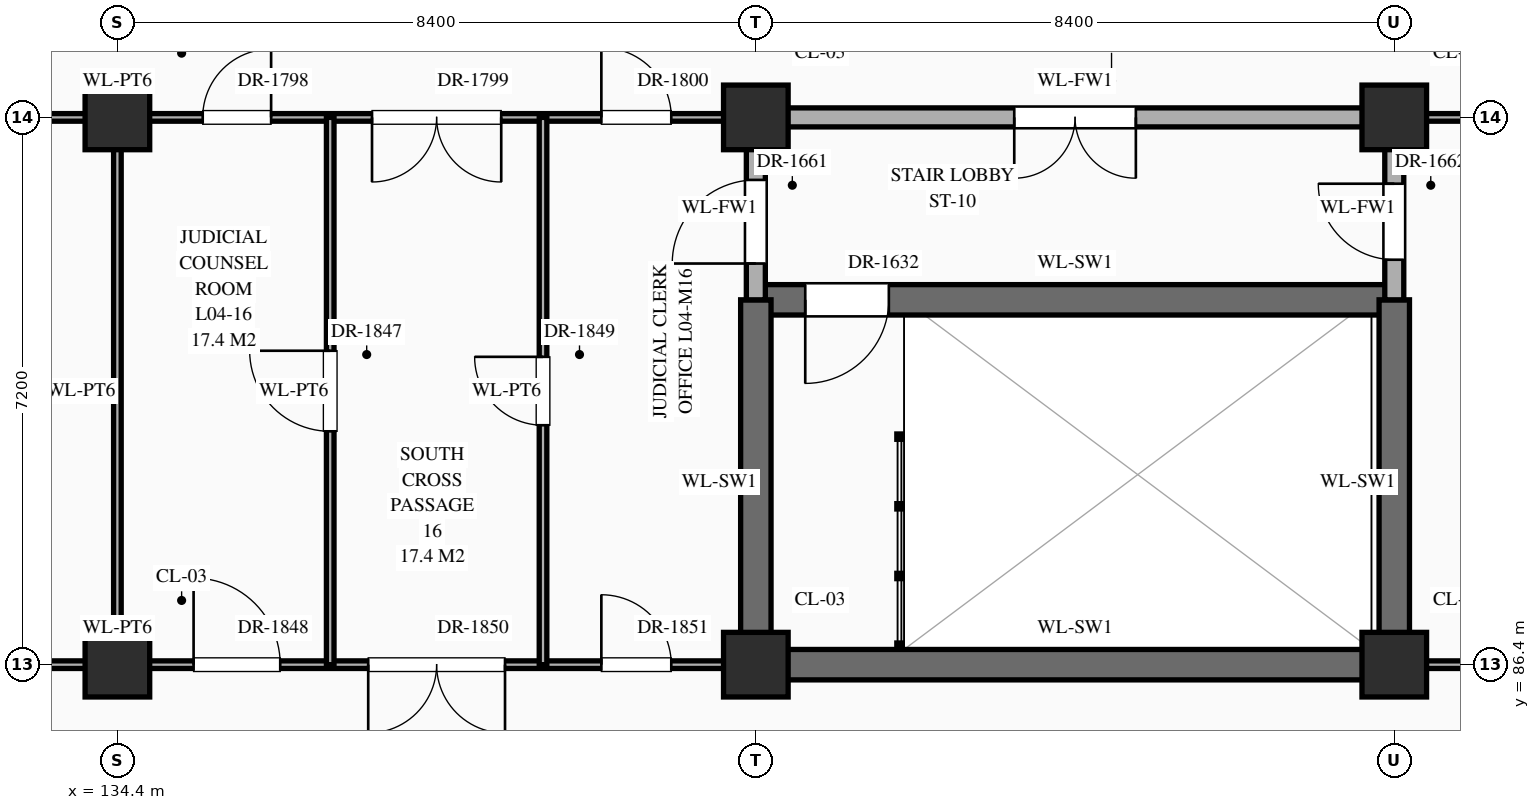
"""IFC4 building model, lengths in metres.
Left out: names, types, materials, properties, quantities, classifications, styles, units other than length and angle.
Written with IfcOpenShell. Run it as: python <this file> out.ifc"""

import sys

from ifc_helpers import new_model, si_unit, direction, frame, frame_2d, origin, origin_2d, place, context, subcontext, project, spatial, rectangle, extrude, element, fill, save


model = new_model("IFC4")
c1 = context("Model", 3, precision=1e-05, world=origin(), true_north=direction((0.0, 1.0)))
c2 = subcontext(c1, "Body", "Model", "MODEL_VIEW")
j1 = project(units=[si_unit("LENGTHUNIT", "METRE"), si_unit("PLANEANGLEUNIT", "RADIAN")], contexts=[c1])
p1 = place(None, origin())
s1 = spatial("IfcSite", under=j1, at=p1, CompositionType="ELEMENT")
p2 = place(p1, origin())
s2 = spatial("IfcBuilding", under=s1, at=p2, CompositionType="ELEMENT")
p3 = place(p2, frame((0.0, 0.0, 16.2)))
s3 = spatial("IfcBuildingStorey", under=s2, at=p3, CompositionType="ELEMENT", Elevation=16.2)
for number, where, z_axis, x_axis in (
    (1, (134.4, 86.4, 0.0), (0.0, 0.0, 1.0), (1.0, 0.0, 0.0)),
    (2, (134.4, 93.6, 0.0), (0.0, 0.0, 1.0), (1.0, 0.0, 0.0)),
    (3, (142.8, 86.4, 0.0), (0.0, 0.0, 1.0), (1.0, 0.0, 0.0)),
    (4, (142.8, 93.6, 0.0), (0.0, 0.0, 1.0), (1.0, 0.0, 0.0)),
    (5, (151.2, 86.4, 0.0), (0.0, 0.0, 1.0), (1.0, 0.0, 0.0)),
    (6, (151.2, 93.6, 0.0), (0.0, 0.0, 1.0), (1.0, 0.0, 0.0)),
):
    element("IfcColumn", number, at=place(p3, frame(where, z_axis=z_axis, x_axis=x_axis)), inside=s3, PredefinedType="COLUMN", context=c2, shape_type="SweptSolid", body=[
        extrude(rectangle(XDim=0.85, YDim=0.85, at=origin_2d()), origin(), (0.0, 0.0, 1.0), 5.4),
    ])
p4 = place(p3, frame((126.0, 86.4, 0.0), z_axis=(0.0, 0.0, 1.0), x_axis=(1.0, 0.0, 0.0)))
e7 = element("IfcWall", 7, at=p4, inside=s3, PredefinedType="STANDARD", context=c2, shape_type="SweptSolid", body=[
    extrude(rectangle(XDim=16.8, YDim=0.1, at=frame_2d((8.4, 0.0))), origin(), (0.0, 0.0, 1.0), 4.27),
])
p5 = place(p4, frame((3.69, 0.0, 0.0)))
e8 = element("IfcOpeningElement", 8, at=p5, cuts=e7, PredefinedType="OPENING", context=c2, shape_type="SweptSolid", body=[
    extrude(rectangle(XDim=1.02, YDim=2.4, at=frame_2d((0.51, 1.2))), frame((0.0, 0.062, 0.0), z_axis=(0.0, -1.0, 0.0), x_axis=(1.0, 0.0, 0.0)), (0.0, 0.0, 1.0), 0.124),
])
p6 = place(p4, frame((9.403, 0.0, 0.0)))
e9 = element("IfcOpeningElement", 9, at=p6, cuts=e7, PredefinedType="OPENING", context=c2, shape_type="SweptSolid", body=[
    extrude(rectangle(XDim=1.14, YDim=2.4, at=frame_2d((0.57, 1.2))), frame((0.0, 0.062, 0.0), z_axis=(0.0, -1.0, 0.0), x_axis=(1.0, 0.0, 0.0)), (0.0, 0.0, 1.0), 0.124),
])
p7 = place(p4, frame((11.7, 0.0, 0.0)))
e10 = element("IfcOpeningElement", 10, at=p7, cuts=e7, PredefinedType="OPENING", context=c2, shape_type="SweptSolid", body=[
    extrude(rectangle(XDim=1.8, YDim=2.5, at=frame_2d((0.9, 1.25))), frame((0.0, 0.062, 0.0), z_axis=(0.0, -1.0, 0.0), x_axis=(1.0, 0.0, 0.0)), (0.0, 0.0, 1.0), 0.124),
])
p8 = place(p4, frame((14.768, 0.0, 0.0)))
e11 = element("IfcOpeningElement", 11, at=p8, cuts=e7, PredefinedType="OPENING", context=c2, shape_type="SweptSolid", body=[
    extrude(rectangle(XDim=0.92, YDim=2.15, at=frame_2d((0.46, 1.075))), frame((0.0, 0.062, 0.0), z_axis=(0.0, -1.0, 0.0), x_axis=(1.0, 0.0, 0.0)), (0.0, 0.0, 1.0), 0.124),
])
p9 = place(p3, frame((142.8, 86.4, 0.0), z_axis=(0.0, 0.0, 1.0), x_axis=(1.0, 0.0, 0.0)))
e12 = element("IfcWall", 12, at=p9, inside=s3, PredefinedType="SHEAR", context=c2, shape_type="SweptSolid", body=[
    extrude(rectangle(XDim=8.4, YDim=0.4, at=frame_2d((4.2, 0.0))), origin(), (0.0, 0.0, 1.0), 5.05),
])
p10 = place(p3, frame((151.2, 86.4, 0.0), z_axis=(0.0, 0.0, 1.0), x_axis=(1.0, 0.0, 0.0)))
e13 = element("IfcWall", 13, at=p10, inside=s3, PredefinedType="STANDARD", context=c2, shape_type="SweptSolid", body=[
    extrude(rectangle(XDim=16.76, YDim=0.1, at=frame_2d((8.38, 0.0))), origin(), (0.0, 0.0, 1.0), 4.35),
])
p11 = place(p10, frame((3.72, 0.0, 0.0)))
e14 = element("IfcOpeningElement", 14, at=p11, cuts=e13, PredefinedType="OPENING", context=c2, shape_type="SweptSolid", body=[
    extrude(rectangle(XDim=0.96, YDim=2.2, at=frame_2d((0.48, 1.1))), frame((0.0, 0.062, 0.0), z_axis=(0.0, -1.0, 0.0), x_axis=(1.0, 0.0, 0.0)), (0.0, 0.0, 1.0), 0.124),
])
p12 = place(p10, frame((9.452, 0.0, 0.0)))
e15 = element("IfcOpeningElement", 15, at=p12, cuts=e13, PredefinedType="OPENING", context=c2, shape_type="SweptSolid", body=[
    extrude(rectangle(XDim=1.04, YDim=2.2, at=frame_2d((0.52, 1.1))), frame((0.0, 0.062, 0.0), z_axis=(0.0, -1.0, 0.0), x_axis=(1.0, 0.0, 0.0)), (0.0, 0.0, 1.0), 0.124),
])
p13 = place(p10, frame((12.04, 0.0, 0.0)))
e16 = element("IfcOpeningElement", 16, at=p13, cuts=e13, PredefinedType="OPENING", context=c2, shape_type="SweptSolid", body=[
    extrude(rectangle(XDim=1.12, YDim=2.25, at=frame_2d((0.56, 1.125))), frame((0.0, 0.062, 0.0), z_axis=(0.0, -1.0, 0.0), x_axis=(1.0, 0.0, 0.0)), (0.0, 0.0, 1.0), 0.124),
])
p14 = place(p10, frame((14.647, 0.0, 0.0)))
e17 = element("IfcOpeningElement", 17, at=p14, cuts=e13, PredefinedType="OPENING", context=c2, shape_type="SweptSolid", body=[
    extrude(rectangle(XDim=1.16, YDim=2.3, at=frame_2d((0.58, 1.15))), frame((0.0, 0.062, 0.0), z_axis=(0.0, -1.0, 0.0), x_axis=(1.0, 0.0, 0.0)), (0.0, 0.0, 1.0), 0.124),
])
p15 = place(p3, frame((142.8, 91.2, 0.0), z_axis=(0.0, 0.0, 1.0), x_axis=(1.0, 0.0, 0.0)))
e18 = element("IfcWall", 18, at=p15, inside=s3, PredefinedType="SHEAR", context=c2, shape_type="SweptSolid", body=[
    extrude(rectangle(XDim=8.4, YDim=0.4, at=frame_2d((4.2, 0.0))), origin(), (0.0, 0.0, 1.0), 5.05),
])
p16 = place(p15, frame((0.65, 0.0, 0.0)))
e19 = element("IfcOpeningElement", 19, at=p16, cuts=e18, PredefinedType="OPENING", context=c2, shape_type="SweptSolid", body=[
    extrude(rectangle(XDim=1.1, YDim=2.2, at=frame_2d((0.55, 1.1))), frame((0.0, 0.212, 0.0), z_axis=(0.0, -1.0, 0.0), x_axis=(1.0, 0.0, 0.0)), (0.0, 0.0, 1.0), 0.424),
])
p17 = place(p3, frame((126.0, 93.6, 0.0), z_axis=(0.0, 0.0, 1.0), x_axis=(1.0, 0.0, 0.0)))
e20 = element("IfcWall", 20, at=p17, inside=s3, PredefinedType="STANDARD", context=c2, shape_type="SweptSolid", body=[
    extrude(rectangle(XDim=16.8, YDim=0.1, at=frame_2d((8.4, 0.0))), origin(), (0.0, 0.0, 1.0), 4.27),
])
p18 = place(p17, frame((3.63, 0.0, 0.0)))
e21 = element("IfcOpeningElement", 21, at=p18, cuts=e20, PredefinedType="OPENING", context=c2, shape_type="SweptSolid", body=[
    extrude(rectangle(XDim=1.14, YDim=2.4, at=frame_2d((0.57, 1.2))), frame((0.0, 0.062, 0.0), z_axis=(0.0, -1.0, 0.0), x_axis=(1.0, 0.0, 0.0)), (0.0, 0.0, 1.0), 0.124),
])
p19 = place(p17, frame((9.522, 0.0, 0.0)))
e22 = element("IfcOpeningElement", 22, at=p19, cuts=e20, PredefinedType="OPENING", context=c2, shape_type="SweptSolid", body=[
    extrude(rectangle(XDim=0.9, YDim=2.15, at=frame_2d((0.45, 1.075))), frame((0.0, 0.062, 0.0), z_axis=(0.0, -1.0, 0.0), x_axis=(1.0, 0.0, 0.0)), (0.0, 0.0, 1.0), 0.124),
])
p20 = place(p17, frame((11.75, 0.0, 0.0)))
e23 = element("IfcOpeningElement", 23, at=p20, cuts=e20, PredefinedType="OPENING", context=c2, shape_type="SweptSolid", body=[
    extrude(rectangle(XDim=1.7, YDim=2.45, at=frame_2d((0.85, 1.225))), frame((0.0, 0.062, 0.0), z_axis=(0.0, -1.0, 0.0), x_axis=(1.0, 0.0, 0.0)), (0.0, 0.0, 1.0), 0.124),
])
p21 = place(p17, frame((14.768, 0.0, 0.0)))
e24 = element("IfcOpeningElement", 24, at=p21, cuts=e20, PredefinedType="OPENING", context=c2, shape_type="SweptSolid", body=[
    extrude(rectangle(XDim=0.92, YDim=2.15, at=frame_2d((0.46, 1.075))), frame((0.0, 0.062, 0.0), z_axis=(0.0, -1.0, 0.0), x_axis=(1.0, 0.0, 0.0)), (0.0, 0.0, 1.0), 0.124),
])
p22 = place(p3, frame((142.8, 93.6, 0.0), z_axis=(0.0, 0.0, 1.0), x_axis=(1.0, 0.0, 0.0)))
e25 = element("IfcWall", 25, at=p22, inside=s3, PredefinedType="STANDARD", context=c2, shape_type="SweptSolid", body=[
    extrude(rectangle(XDim=8.4, YDim=0.25, at=frame_2d((4.2, 0.0))), origin(), (0.0, 0.0, 1.0), 4.2),
])
p23 = place(p22, frame((3.4, 0.0, 0.0)))
e26 = element("IfcOpeningElement", 26, at=p23, cuts=e25, PredefinedType="OPENING", context=c2, shape_type="SweptSolid", body=[
    extrude(rectangle(XDim=1.6, YDim=2.3, at=frame_2d((0.8, 1.15))), frame((0.0, 0.137, 0.0), z_axis=(0.0, -1.0, 0.0), x_axis=(1.0, 0.0, 0.0)), (0.0, 0.0, 1.0), 0.274),
])
p24 = place(p3, frame((151.2, 93.6, 0.0), z_axis=(0.0, 0.0, 1.0), x_axis=(1.0, 0.0, 0.0)))
e27 = element("IfcWall", 27, at=p24, inside=s3, PredefinedType="STANDARD", context=c2, shape_type="SweptSolid", body=[
    extrude(rectangle(XDim=16.76, YDim=0.1, at=frame_2d((8.38, 0.0))), origin(), (0.0, 0.0, 1.0), 4.35),
])
p25 = place(p24, frame((3.72, 0.0, 0.0)))
e28 = element("IfcOpeningElement", 28, at=p25, cuts=e27, PredefinedType="OPENING", context=c2, shape_type="SweptSolid", body=[
    extrude(rectangle(XDim=0.96, YDim=2.2, at=frame_2d((0.48, 1.1))), frame((0.0, 0.062, 0.0), z_axis=(0.0, -1.0, 0.0), x_axis=(1.0, 0.0, 0.0)), (0.0, 0.0, 1.0), 0.124),
])
p26 = place(p24, frame((9.472, 0.0, 0.0)))
e29 = element("IfcOpeningElement", 29, at=p26, cuts=e27, PredefinedType="OPENING", context=c2, shape_type="SweptSolid", body=[
    extrude(rectangle(XDim=1.0, YDim=2.25, at=frame_2d((0.5, 1.125))), frame((0.0, 0.062, 0.0), z_axis=(0.0, -1.0, 0.0), x_axis=(1.0, 0.0, 0.0)), (0.0, 0.0, 1.0), 0.124),
])
p27 = place(p24, frame((12.08, 0.0, 0.0)))
e30 = element("IfcOpeningElement", 30, at=p27, cuts=e27, PredefinedType="OPENING", context=c2, shape_type="SweptSolid", body=[
    extrude(rectangle(XDim=1.04, YDim=2.2, at=frame_2d((0.52, 1.1))), frame((0.0, 0.062, 0.0), z_axis=(0.0, -1.0, 0.0), x_axis=(1.0, 0.0, 0.0)), (0.0, 0.0, 1.0), 0.124),
])
p28 = place(p24, frame((14.688, 0.0, 0.0)))
e31 = element("IfcOpeningElement", 31, at=p28, cuts=e27, PredefinedType="OPENING", context=c2, shape_type="SweptSolid", body=[
    extrude(rectangle(XDim=1.08, YDim=2.25, at=frame_2d((0.54, 1.125))), frame((0.0, 0.062, 0.0), z_axis=(0.0, -1.0, 0.0), x_axis=(1.0, 0.0, 0.0)), (0.0, 0.0, 1.0), 0.124),
])
p29 = place(p3, frame((134.4, 86.4, 0.0), z_axis=(0.0, 0.0, 1.0), x_axis=(0.0, 1.0, 0.0)))
e32 = element("IfcWall", 32, at=p29, inside=s3, PredefinedType="STANDARD", context=c2, shape_type="SweptSolid", body=[
    extrude(rectangle(XDim=7.2, YDim=0.1, at=frame_2d((3.6, 0.0))), origin(), (0.0, 0.0, 1.0), 4.37),
])
p30 = place(p3, frame((137.2, 86.4, 0.0), z_axis=(0.0, 0.0, 1.0), x_axis=(0.0, 1.0, 0.0)))
e33 = element("IfcWall", 33, at=p30, inside=s3, PredefinedType="STANDARD", context=c2, shape_type="SweptSolid", body=[
    extrude(rectangle(XDim=7.2, YDim=0.1, at=frame_2d((3.6, 0.0))), origin(), (0.0, 0.0, 1.0), 5.12),
])
p31 = place(p30, frame((3.07, 0.0, 0.0)))
e34 = element("IfcOpeningElement", 34, at=p31, cuts=e33, PredefinedType="OPENING", context=c2, shape_type="SweptSolid", body=[
    extrude(rectangle(XDim=1.06, YDim=2.4, at=frame_2d((0.53, 1.2))), frame((0.0, 0.062, 0.0), z_axis=(0.0, -1.0, 0.0), x_axis=(1.0, 0.0, 0.0)), (0.0, 0.0, 1.0), 0.124),
])
p32 = place(p3, frame((140.0, 86.4, 0.0), z_axis=(0.0, 0.0, 1.0), x_axis=(0.0, 1.0, 0.0)))
e35 = element("IfcWall", 35, at=p32, inside=s3, PredefinedType="STANDARD", context=c2, shape_type="SweptSolid", body=[
    extrude(rectangle(XDim=7.2, YDim=0.1, at=frame_2d((3.6, 0.0))), origin(), (0.0, 0.0, 1.0), 5.12),
])
p33 = place(p32, frame((3.15, 0.0, 0.0)))
e36 = element("IfcOpeningElement", 36, at=p33, cuts=e35, PredefinedType="OPENING", context=c2, shape_type="SweptSolid", body=[
    extrude(rectangle(XDim=0.9, YDim=2.15, at=frame_2d((0.45, 1.075))), frame((0.0, 0.062, 0.0), z_axis=(0.0, -1.0, 0.0), x_axis=(1.0, 0.0, 0.0)), (0.0, 0.0, 1.0), 0.124),
])
p34 = place(p3, frame((142.8, 86.4, 0.0), z_axis=(0.0, 0.0, 1.0), x_axis=(0.0, 1.0, 0.0)))
e37 = element("IfcWall", 37, at=p34, inside=s3, PredefinedType="SHEAR", context=c2, shape_type="SweptSolid", body=[
    extrude(rectangle(XDim=4.8, YDim=0.4, at=frame_2d((2.4, 0.0))), origin(), (0.0, 0.0, 1.0), 5.12),
])
p35 = place(p3, frame((142.8, 91.2, 0.0), z_axis=(0.0, 0.0, 1.0), x_axis=(0.0, 1.0, 0.0)))
e38 = element("IfcWall", 38, at=p35, inside=s3, PredefinedType="STANDARD", context=c2, shape_type="SweptSolid", body=[
    extrude(rectangle(XDim=2.4, YDim=0.25, at=frame_2d((1.2, 0.0))), origin(), (0.0, 0.0, 1.0), 4.3),
])
p36 = place(p35, frame((0.478, 0.0, 0.0)))
e39 = element("IfcOpeningElement", 39, at=p36, cuts=e38, PredefinedType="OPENING", context=c2, shape_type="SweptSolid", body=[
    extrude(rectangle(XDim=1.1, YDim=2.2, at=frame_2d((0.55, 1.1))), frame((0.0, 0.137, 0.0), z_axis=(0.0, -1.0, 0.0), x_axis=(1.0, 0.0, 0.0)), (0.0, 0.0, 1.0), 0.274),
])
p37 = place(p3, frame((151.2, 86.4, 0.0), z_axis=(0.0, 0.0, 1.0), x_axis=(0.0, 1.0, 0.0)))
e40 = element("IfcWall", 40, at=p37, inside=s3, PredefinedType="SHEAR", context=c2, shape_type="SweptSolid", body=[
    extrude(rectangle(XDim=4.8, YDim=0.4, at=frame_2d((2.4, 0.0))), origin(), (0.0, 0.0, 1.0), 5.05),
])
p38 = place(p3, frame((151.2, 91.2, 0.0), z_axis=(0.0, 0.0, 1.0), x_axis=(0.0, 1.0, 0.0)))
e41 = element("IfcWall", 41, at=p38, inside=s3, PredefinedType="STANDARD", context=c2, shape_type="SweptSolid", body=[
    extrude(rectangle(XDim=2.4, YDim=0.25, at=frame_2d((1.2, 0.0))), origin(), (0.0, 0.0, 1.0), 4.3),
])
p39 = place(p38, frame((0.528, 0.0, 0.0)))
e42 = element("IfcOpeningElement", 42, at=p39, cuts=e41, PredefinedType="OPENING", context=c2, shape_type="SweptSolid", body=[
    extrude(rectangle(XDim=1.0, YDim=2.2, at=frame_2d((0.5, 1.1))), frame((0.0, 0.137, 0.0), z_axis=(0.0, -1.0, 0.0), x_axis=(1.0, 0.0, 0.0)), (0.0, 0.0, 1.0), 0.274),
])
p40 = place(p16, frame((1.1, 0.0, 0.0), z_axis=(0.0, 0.0, 1.0), x_axis=(-1.0, 0.0, 0.0)))
e43 = element("IfcDoor", 43, at=p40, inside=s3, OperationType="SINGLE_SWING_RIGHT", PredefinedType="DOOR", context=c2, shape_type="SweptSolid", body=[
    extrude(rectangle(XDim=1.1, YDim=2.2, at=frame_2d((0.55, 1.1))), frame((0.0, 0.025, 0.0), z_axis=(0.0, -1.0, 0.0), x_axis=(1.0, 0.0, 0.0)), (0.0, 0.0, 1.0), 0.05),
])
fill(e19, e43)
p41 = place(p23, frame((1.6, 0.0, 0.0), z_axis=(0.0, 0.0, 1.0), x_axis=(-1.0, 0.0, 0.0)))
e44 = element("IfcDoor", 44, at=p41, inside=s3, OperationType="DOUBLE_DOOR_SINGLE_SWING", PredefinedType="DOOR", context=c2, shape_type="SweptSolid", body=[
    extrude(rectangle(XDim=1.6, YDim=2.3, at=frame_2d((0.8, 1.15))), frame((0.0, 0.025, 0.0), z_axis=(0.0, -1.0, 0.0), x_axis=(1.0, 0.0, 0.0)), (0.0, 0.0, 1.0), 0.05),
])
fill(e26, e44)
p42 = place(p36, origin())
e45 = element("IfcDoor", 45, at=p42, inside=s3, OperationType="SINGLE_SWING_LEFT", PredefinedType="DOOR", context=c2, shape_type="SweptSolid", body=[
    extrude(rectangle(XDim=1.1, YDim=2.2, at=frame_2d((0.55, 1.1))), frame((0.0, 0.025, 0.0), z_axis=(0.0, -1.0, 0.0), x_axis=(1.0, 0.0, 0.0)), (0.0, 0.0, 1.0), 0.05),
])
fill(e39, e45)
p43 = place(p39, origin())
e46 = element("IfcDoor", 46, at=p43, inside=s3, OperationType="SINGLE_SWING_RIGHT", PredefinedType="DOOR", context=c2, shape_type="SweptSolid", body=[
    extrude(rectangle(XDim=1.0, YDim=2.2, at=frame_2d((0.5, 1.1))), frame((0.0, 0.025, 0.0), z_axis=(0.0, -1.0, 0.0), x_axis=(1.0, 0.0, 0.0)), (0.0, 0.0, 1.0), 0.05),
])
fill(e42, e46)
p44 = place(p19, origin())
e47 = element("IfcDoor", 47, at=p44, inside=s3, OperationType="SINGLE_SWING_RIGHT", PredefinedType="DOOR", context=c2, shape_type="SweptSolid", body=[
    extrude(rectangle(XDim=0.9, YDim=2.15, at=frame_2d((0.45, 1.075))), frame((0.0, 0.025, 0.0), z_axis=(0.0, -1.0, 0.0), x_axis=(1.0, 0.0, 0.0)), (0.0, 0.0, 1.0), 0.05),
])
fill(e22, e47)
p45 = place(p20, frame((1.7, 0.0, 0.0), z_axis=(0.0, 0.0, 1.0), x_axis=(-1.0, 0.0, 0.0)))
e48 = element("IfcDoor", 48, at=p45, inside=s3, OperationType="DOUBLE_DOOR_SINGLE_SWING", PredefinedType="DOOR", context=c2, shape_type="SweptSolid", body=[
    extrude(rectangle(XDim=1.7, YDim=2.45, at=frame_2d((0.85, 1.225))), frame((0.0, 0.025, 0.0), z_axis=(0.0, -1.0, 0.0), x_axis=(1.0, 0.0, 0.0)), (0.0, 0.0, 1.0), 0.05),
])
fill(e23, e48)
p46 = place(p21, origin())
e49 = element("IfcDoor", 49, at=p46, inside=s3, OperationType="SINGLE_SWING_LEFT", PredefinedType="DOOR", context=c2, shape_type="SweptSolid", body=[
    extrude(rectangle(XDim=0.92, YDim=2.15, at=frame_2d((0.46, 1.075))), frame((0.0, 0.025, 0.0), z_axis=(0.0, -1.0, 0.0), x_axis=(1.0, 0.0, 0.0)), (0.0, 0.0, 1.0), 0.05),
])
fill(e24, e49)
p47 = place(p31, origin())
e50 = element("IfcDoor", 50, at=p47, inside=s3, OperationType="SINGLE_SWING_RIGHT", PredefinedType="DOOR", context=c2, shape_type="SweptSolid", body=[
    extrude(rectangle(XDim=1.06, YDim=2.4, at=frame_2d((0.53, 1.2))), frame((0.0, 0.025, 0.0), z_axis=(0.0, -1.0, 0.0), x_axis=(1.0, 0.0, 0.0)), (0.0, 0.0, 1.0), 0.05),
])
fill(e34, e50)
p48 = place(p6, origin())
e51 = element("IfcDoor", 51, at=p48, inside=s3, OperationType="SINGLE_SWING_LEFT", PredefinedType="DOOR", context=c2, shape_type="SweptSolid", body=[
    extrude(rectangle(XDim=1.14, YDim=2.4, at=frame_2d((0.57, 1.2))), frame((0.0, 0.025, 0.0), z_axis=(0.0, -1.0, 0.0), x_axis=(1.0, 0.0, 0.0)), (0.0, 0.0, 1.0), 0.05),
])
fill(e9, e51)
p49 = place(p33, origin())
e52 = element("IfcDoor", 52, at=p49, inside=s3, OperationType="SINGLE_SWING_RIGHT", PredefinedType="DOOR", context=c2, shape_type="SweptSolid", body=[
    extrude(rectangle(XDim=0.9, YDim=2.15, at=frame_2d((0.45, 1.075))), frame((0.0, 0.025, 0.0), z_axis=(0.0, -1.0, 0.0), x_axis=(1.0, 0.0, 0.0)), (0.0, 0.0, 1.0), 0.05),
])
fill(e36, e52)
p50 = place(p7, frame((1.8, 0.0, 0.0), z_axis=(0.0, 0.0, 1.0), x_axis=(-1.0, 0.0, 0.0)))
e53 = element("IfcDoor", 53, at=p50, inside=s3, OperationType="DOUBLE_DOOR_SINGLE_SWING", PredefinedType="DOOR", context=c2, shape_type="SweptSolid", body=[
    extrude(rectangle(XDim=1.8, YDim=2.5, at=frame_2d((0.9, 1.25))), frame((0.0, 0.025, 0.0), z_axis=(0.0, -1.0, 0.0), x_axis=(1.0, 0.0, 0.0)), (0.0, 0.0, 1.0), 0.05),
])
fill(e10, e53)
p51 = place(p8, origin())
e54 = element("IfcDoor", 54, at=p51, inside=s3, OperationType="SINGLE_SWING_LEFT", PredefinedType="DOOR", context=c2, shape_type="SweptSolid", body=[
    extrude(rectangle(XDim=0.92, YDim=2.15, at=frame_2d((0.46, 1.075))), frame((0.0, 0.025, 0.0), z_axis=(0.0, -1.0, 0.0), x_axis=(1.0, 0.0, 0.0)), (0.0, 0.0, 1.0), 0.05),
])
fill(e11, e54)
save(model, sys.argv[1])
